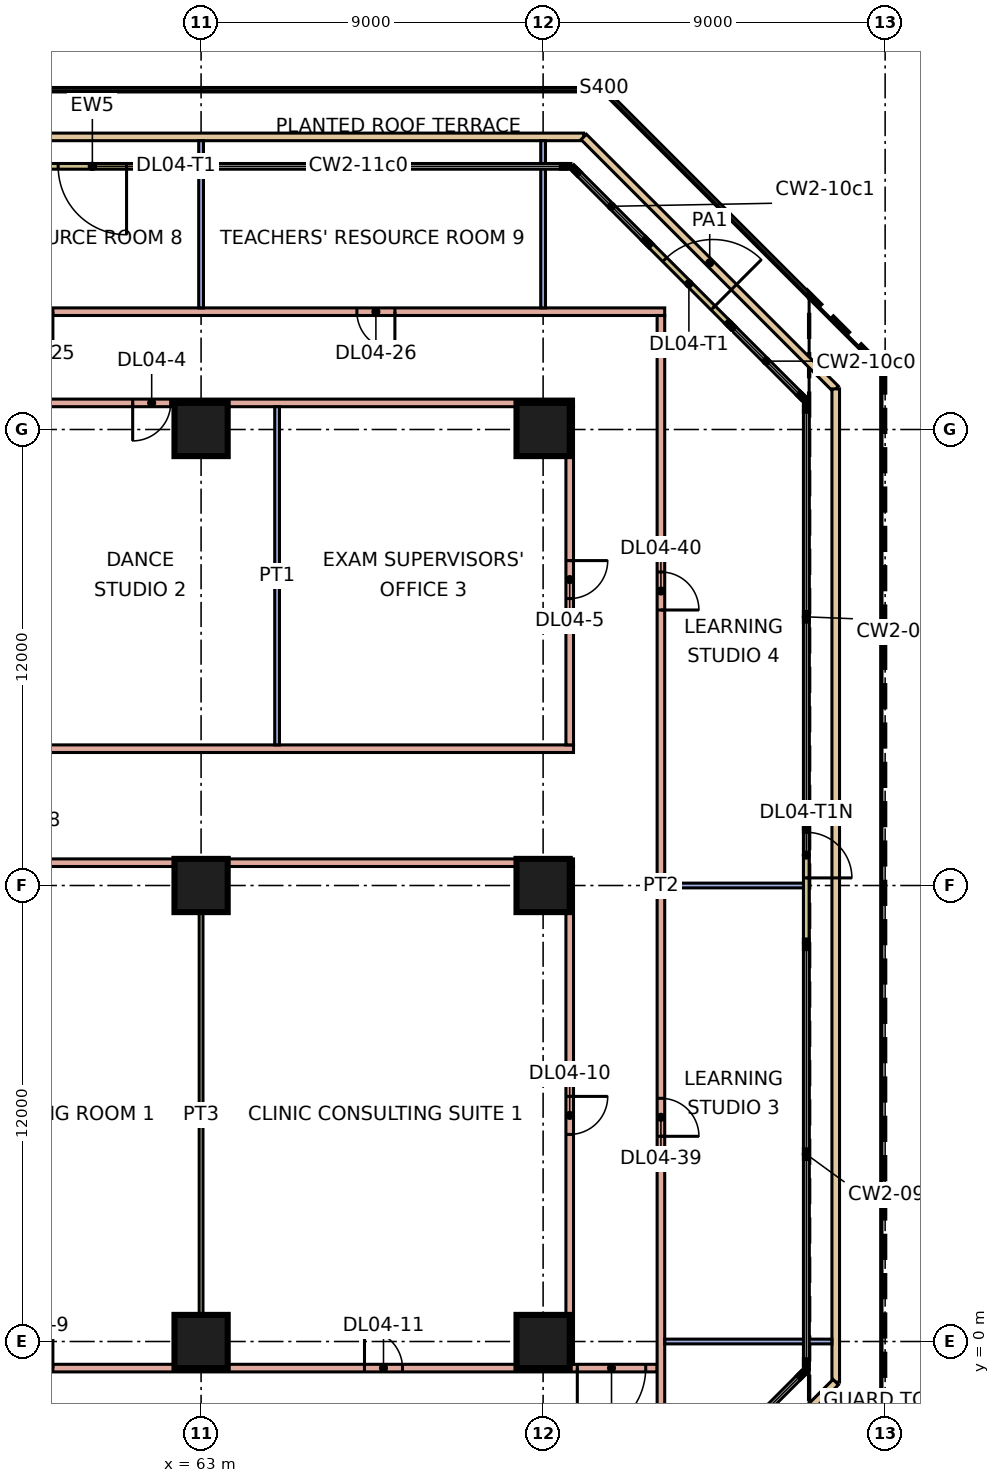
"""IFC4 building model, lengths in metres.
Left out: names, types, materials, properties, quantities, classifications, styles, units other than length and angle.
Written with IfcOpenShell. Run it as: python <this file> out.ifc"""

import sys

from ifc_helpers import new_model, si_unit, direction, frame, frame_2d, origin, origin_2d, place, context, subcontext, project, spatial, rectangle, extrude, element, fill, save


model = new_model("IFC4")
c1 = context("Model", 3, precision=1e-05, world=origin(), true_north=direction((0.0, 1.0)))
c2 = subcontext(c1, "Body", "Model", "MODEL_VIEW")
j1 = project(units=[si_unit("LENGTHUNIT", "METRE"), si_unit("PLANEANGLEUNIT", "RADIAN")], contexts=[c1])
p1 = place(None, origin())
s1 = spatial("IfcSite", under=j1, at=p1, CompositionType="ELEMENT")
p2 = place(p1, origin())
s2 = spatial("IfcBuilding", under=s1, at=p2, CompositionType="ELEMENT")
p3 = place(p2, frame((0.0, 0.0, 21.6)))
s3 = spatial("IfcBuildingStorey", under=s2, at=p3, CompositionType="ELEMENT", Elevation=21.6)
for number, where, z_axis, x_axis in (
    (1, (63.0, 0.0, 0.0), (0.0, 0.0, 1.0), (1.0, 0.0, 0.0)),
    (2, (72.0, 0.0, 0.0), (0.0, 0.0, 1.0), (1.0, 0.0, 0.0)),
    (3, (63.0, 12.0, 0.0), (0.0, 0.0, 1.0), (1.0, 0.0, 0.0)),
    (4, (72.0, 12.0, 0.0), (0.0, 0.0, 1.0), (1.0, 0.0, 0.0)),
    (5, (63.0, 24.0, 0.0), (0.0, 0.0, 1.0), (1.0, 0.0, 0.0)),
    (6, (72.0, 24.0, 0.0), (0.0, 0.0, 1.0), (1.0, 0.0, 0.0)),
):
    element("IfcColumn", number, at=place(p3, frame(where, z_axis=z_axis, x_axis=x_axis)), inside=s3, PredefinedType="COLUMN", context=c2, shape_type="SweptSolid", body=[
        extrude(rectangle(XDim=1.4, YDim=1.4, at=origin_2d()), origin(), (0.0, 0.0, 1.0), 4.8),
    ])
p4 = place(p3, frame((78.925, 10.5, 0.0), z_axis=(0.0, 0.0, 1.0), x_axis=(0.0, 1.0, 0.0)))
e7 = element("IfcWall", 7, at=p4, inside=s3, PredefinedType="SOLIDWALL", context=c2, shape_type="SweptSolid", body=[
    extrude(rectangle(XDim=3.0, YDim=0.15, at=frame_2d((1.5, 0.0))), origin(), (0.0, 0.0, 1.0), 4.4),
])
p5 = place(p4, frame((1.7, 0.0, 0.0)))
e8 = element("IfcOpeningElement", 8, at=p5, cuts=e7, PredefinedType="OPENING", context=c2, shape_type="SweptSolid", body=[
    extrude(rectangle(XDim=1.2, YDim=2.4, at=frame_2d((0.6, 1.2))), frame((0.0, 0.085, 0.0), z_axis=(0.0, -1.0, 0.0), x_axis=(1.0, 0.0, 0.0)), (0.0, 0.0, 1.0), 0.17),
])
p6 = place(p3, frame((76.897, 26.775, 0.0), z_axis=(0.0, 0.0, 1.0), x_axis=(-0.707106781187, 0.707106781187, 0.0)))
e9 = element("IfcWall", 9, at=p6, inside=s3, PredefinedType="SOLIDWALL", context=c2, shape_type="SweptSolid", body=[
    extrude(rectangle(XDim=3.0, YDim=0.15, at=frame_2d((1.5, 0.0))), origin(), (0.0, 0.0, 1.0), 4.4),
])
p7 = place(p6, frame((0.6, 0.0, 0.0)))
e10 = element("IfcOpeningElement", 10, at=p7, cuts=e9, PredefinedType="OPENING", context=c2, shape_type="SweptSolid", body=[
    extrude(rectangle(XDim=1.8, YDim=2.4, at=frame_2d((0.9, 1.2))), frame((0.0, 0.085, 0.0), z_axis=(0.0, -1.0, 0.0), x_axis=(1.0, 0.0, 0.0)), (0.0, 0.0, 1.0), 0.17),
])
p8 = place(p3, frame((61.639, 30.925, 0.0), z_axis=(0.0, 0.0, 1.0), x_axis=(-1.0, 0.0, 0.0)))
e11 = element("IfcWall", 11, at=p8, inside=s3, PredefinedType="SOLIDWALL", context=c2, shape_type="SweptSolid", body=[
    extrude(rectangle(XDim=3.0, YDim=0.15, at=frame_2d((1.5, 0.0))), origin(), (0.0, 0.0, 1.0), 4.4),
])
p9 = place(p8, frame((0.6, 0.0, 0.0)))
e12 = element("IfcOpeningElement", 12, at=p9, cuts=e11, PredefinedType="OPENING", context=c2, shape_type="SweptSolid", body=[
    extrude(rectangle(XDim=1.8, YDim=2.4, at=frame_2d((0.9, 1.2))), frame((0.0, 0.085, 0.0), z_axis=(0.0, -1.0, 0.0), x_axis=(1.0, 0.0, 0.0)), (0.0, 0.0, 1.0), 0.17),
])
p10 = place(p3, frame((48.2, 31.7, 0.0), z_axis=(0.0, 0.0, 1.0), x_axis=(1.0, 0.0, 0.0)))
e13 = element("IfcWall", 13, at=p10, inside=s3, PredefinedType="PARAPET", context=c2, shape_type="SweptSolid", body=[
    extrude(rectangle(XDim=24.868, YDim=0.2, at=frame_2d((12.434, 0.0))), origin(), (0.0, 0.0, 1.0), 0.5),
])
p11 = place(p3, frame((73.068, 31.7, 0.0), z_axis=(0.0, 0.0, 1.0), x_axis=(0.707106781187, -0.707106781187, 0.0)))
e14 = element("IfcWall", 14, at=p11, inside=s3, PredefinedType="PARAPET", context=c2, shape_type="SweptSolid", body=[
    extrude(rectangle(XDim=9.379, YDim=0.2, at=frame_2d((4.689, 0.0))), origin(), (0.0, 0.0, 1.0), 0.5),
])
p12 = place(p3, frame((79.7, 25.068, 0.0), z_axis=(0.0, 0.0, 1.0), x_axis=(0.0, -1.0, 0.0)))
e15 = element("IfcWall", 15, at=p12, inside=s3, PredefinedType="PARAPET", context=c2, shape_type="SweptSolid", body=[
    extrude(rectangle(XDim=26.136, YDim=0.2, at=frame_2d((13.068, 0.0))), origin(), (0.0, 0.0, 1.0), 0.5),
])
p13 = place(p3, frame((79.7, -1.068, 0.0), z_axis=(0.0, 0.0, 1.0), x_axis=(-0.707106781187, -0.707106781187, 0.0)))
e16 = element("IfcWall", 16, at=p13, inside=s3, PredefinedType="PARAPET", context=c2, shape_type="SweptSolid", body=[
    extrude(rectangle(XDim=9.379, YDim=0.2, at=frame_2d((4.689, 0.0))), origin(), (0.0, 0.0, 1.0), 0.5),
])
p14 = place(p3, frame((38.3, 27.1, 0.0), z_axis=(0.0, 0.0, 1.0), x_axis=(1.0, 0.0, 0.0)))
e17 = element("IfcWall", 17, at=p14, inside=s3, PredefinedType="PARTITIONING", context=c2, shape_type="SweptSolid", body=[
    extrude(rectangle(XDim=36.9, YDim=0.2, at=frame_2d((18.45, 0.0))), origin(), (0.0, 0.0, 1.0), 4.4),
])
p15 = place(p14, frame((10.8, 0.0, 0.0)))
e18 = element("IfcOpeningElement", 18, at=p15, cuts=e17, PredefinedType="OPENING", context=c2, shape_type="SweptSolid", body=[
    extrude(rectangle(XDim=1.0, YDim=2.1, at=frame_2d((0.5, 1.05))), frame((0.0, 0.11, 0.0), z_axis=(0.0, -1.0, 0.0), x_axis=(1.0, 0.0, 0.0)), (0.0, 0.0, 1.0), 0.22),
])
p16 = place(p14, frame((19.8, 0.0, 0.0)))
e19 = element("IfcOpeningElement", 19, at=p16, cuts=e17, PredefinedType="OPENING", context=c2, shape_type="SweptSolid", body=[
    extrude(rectangle(XDim=1.0, YDim=2.1, at=frame_2d((0.5, 1.05))), frame((0.0, 0.11, 0.0), z_axis=(0.0, -1.0, 0.0), x_axis=(1.0, 0.0, 0.0)), (0.0, 0.0, 1.0), 0.22),
])
p17 = place(p14, frame((28.8, 0.0, 0.0)))
e20 = element("IfcOpeningElement", 20, at=p17, cuts=e17, PredefinedType="OPENING", context=c2, shape_type="SweptSolid", body=[
    extrude(rectangle(XDim=1.0, YDim=2.1, at=frame_2d((0.5, 1.05))), frame((0.0, 0.11, 0.0), z_axis=(0.0, -1.0, 0.0), x_axis=(1.0, 0.0, 0.0)), (0.0, 0.0, 1.0), 0.22),
])
p18 = place(p3, frame((40.2, 24.7, 0.0), z_axis=(0.0, 0.0, 1.0), x_axis=(1.0, 0.0, 0.0)))
e21 = element("IfcWall", 21, at=p18, inside=s3, PredefinedType="PARTITIONING", context=c2, shape_type="SweptSolid", body=[
    extrude(rectangle(XDim=32.6, YDim=0.2, at=frame_2d((16.3, 0.0))), origin(), (0.0, 0.0, 1.0), 4.4),
])
p19 = place(p18, frame((2.65, 0.0, 0.0)))
e22 = element("IfcOpeningElement", 22, at=p19, cuts=e21, PredefinedType="OPENING", context=c2, shape_type="SweptSolid", body=[
    extrude(rectangle(XDim=1.0, YDim=2.1, at=frame_2d((0.5, 1.05))), frame((0.0, 0.11, 0.0), z_axis=(0.0, -1.0, 0.0), x_axis=(1.0, 0.0, 0.0)), (0.0, 0.0, 1.0), 0.22),
])
p20 = place(p18, frame((8.85, 0.0, 0.0)))
e23 = element("IfcOpeningElement", 23, at=p20, cuts=e21, PredefinedType="OPENING", context=c2, shape_type="SweptSolid", body=[
    extrude(rectangle(XDim=1.0, YDim=2.1, at=frame_2d((0.5, 1.05))), frame((0.0, 0.11, 0.0), z_axis=(0.0, -1.0, 0.0), x_axis=(1.0, 0.0, 0.0)), (0.0, 0.0, 1.0), 0.22),
])
p21 = place(p18, frame((15.05, 0.0, 0.0)))
e24 = element("IfcOpeningElement", 24, at=p21, cuts=e21, PredefinedType="OPENING", context=c2, shape_type="SweptSolid", body=[
    extrude(rectangle(XDim=1.0, YDim=2.1, at=frame_2d((0.5, 1.05))), frame((0.0, 0.11, 0.0), z_axis=(0.0, -1.0, 0.0), x_axis=(1.0, 0.0, 0.0)), (0.0, 0.0, 1.0), 0.22),
])
p22 = place(p18, frame((21.0, 0.0, 0.0)))
e25 = element("IfcOpeningElement", 25, at=p22, cuts=e21, PredefinedType="OPENING", context=c2, shape_type="SweptSolid", body=[
    extrude(rectangle(XDim=1.0, YDim=2.1, at=frame_2d((0.5, 1.05))), frame((0.0, 0.11, 0.0), z_axis=(0.0, -1.0, 0.0), x_axis=(1.0, 0.0, 0.0)), (0.0, 0.0, 1.0), 0.22),
])
p23 = place(p3, frame((51.225, 15.6, 0.0), z_axis=(0.0, 0.0, 1.0), x_axis=(1.0, 0.0, 0.0)))
e26 = element("IfcWall", 26, at=p23, inside=s3, PredefinedType="PARTITIONING", context=c2, shape_type="SweptSolid", body=[
    extrude(rectangle(XDim=21.575, YDim=0.2, at=frame_2d((10.788, 0.0))), origin(), (0.0, 0.0, 1.0), 4.4),
])
p24 = place(p3, frame((54.0, -0.7, 0.0), z_axis=(0.0, 0.0, 1.0), x_axis=(1.0, 0.0, 0.0)))
e27 = element("IfcWall", 27, at=p24, inside=s3, PredefinedType="PARTITIONING", context=c2, shape_type="SweptSolid", body=[
    extrude(rectangle(XDim=21.0, YDim=0.2, at=frame_2d((10.5, 0.0))), origin(), (0.0, 0.0, 1.0), 4.4),
])
p25 = place(p24, frame((4.1, 0.0, 0.0)))
e28 = element("IfcOpeningElement", 28, at=p25, cuts=e27, PredefinedType="OPENING", context=c2, shape_type="SweptSolid", body=[
    extrude(rectangle(XDim=1.0, YDim=2.1, at=frame_2d((0.5, 1.05))), frame((0.0, 0.11, 0.0), z_axis=(0.0, -1.0, 0.0), x_axis=(1.0, 0.0, 0.0)), (0.0, 0.0, 1.0), 0.22),
])
p26 = place(p24, frame((13.3, 0.0, 0.0)))
e29 = element("IfcOpeningElement", 29, at=p26, cuts=e27, PredefinedType="OPENING", context=c2, shape_type="SweptSolid", body=[
    extrude(rectangle(XDim=1.0, YDim=2.1, at=frame_2d((0.5, 1.05))), frame((0.0, 0.11, 0.0), z_axis=(0.0, -1.0, 0.0), x_axis=(1.0, 0.0, 0.0)), (0.0, 0.0, 1.0), 0.22),
])
p27 = place(p24, frame((18.9, 0.0, 0.0)))
e30 = element("IfcOpeningElement", 30, at=p27, cuts=e27, PredefinedType="OPENING", context=c2, shape_type="SweptSolid", body=[
    extrude(rectangle(XDim=1.8, YDim=2.1, at=frame_2d((0.9, 1.05))), frame((0.0, 0.11, 0.0), z_axis=(0.0, -1.0, 0.0), x_axis=(1.0, 0.0, 0.0)), (0.0, 0.0, 1.0), 0.22),
])
p28 = place(p3, frame((54.0, 12.6, 0.0), z_axis=(0.0, 0.0, 1.0), x_axis=(1.0, 0.0, 0.0)))
e31 = element("IfcWall", 31, at=p28, inside=s3, PredefinedType="PARTITIONING", context=c2, shape_type="SweptSolid", body=[
    extrude(rectangle(XDim=18.8, YDim=0.2, at=frame_2d((9.4, 0.0))), origin(), (0.0, 0.0, 1.0), 4.4),
])
p29 = place(p28, frame((3.9, 0.0, 0.0)))
e32 = element("IfcOpeningElement", 32, at=p29, cuts=e31, PredefinedType="OPENING", context=c2, shape_type="SweptSolid", body=[
    extrude(rectangle(XDim=1.0, YDim=2.1, at=frame_2d((0.5, 1.05))), frame((0.0, 0.11, 0.0), z_axis=(0.0, -1.0, 0.0), x_axis=(1.0, 0.0, 0.0)), (0.0, 0.0, 1.0), 0.22),
])
p30 = place(p3, frame((63.0, -0.6, 0.0), z_axis=(0.0, 0.0, 1.0), x_axis=(0.0, 1.0, 0.0)))
e33 = element("IfcWall", 33, at=p30, inside=s3, PredefinedType="PARTITIONING", context=c2, shape_type="SweptSolid", body=[
    extrude(rectangle(XDim=13.1, YDim=0.1, at=frame_2d((6.55, 0.0))), origin(), (0.0, 0.0, 1.0), 4.4),
])
p31 = place(p3, frame((63.0, 27.2, 0.0), z_axis=(0.0, 0.0, 1.0), x_axis=(0.0, 1.0, 0.0)))
e34 = element("IfcWall", 34, at=p31, inside=s3, PredefinedType="PARTITIONING", context=c2, shape_type="SweptSolid", body=[
    extrude(rectangle(XDim=4.4, YDim=0.125, at=frame_2d((2.2, 0.0))), origin(), (0.0, 0.0, 1.0), 4.4),
])
p32 = place(p3, frame((65.0, 15.7, 0.0), z_axis=(0.0, 0.0, 1.0), x_axis=(0.0, 1.0, 0.0)))
e35 = element("IfcWall", 35, at=p32, inside=s3, PredefinedType="PARTITIONING", context=c2, shape_type="SweptSolid", body=[
    extrude(rectangle(XDim=8.9, YDim=0.125, at=frame_2d((4.45, 0.0))), origin(), (0.0, 0.0, 1.0), 4.4),
])
p33 = place(p3, frame((72.0, 27.2, 0.0), z_axis=(0.0, 0.0, 1.0), x_axis=(0.0, 1.0, 0.0)))
e36 = element("IfcWall", 36, at=p33, inside=s3, PredefinedType="PARTITIONING", context=c2, shape_type="SweptSolid", body=[
    extrude(rectangle(XDim=4.4, YDim=0.125, at=frame_2d((2.2, 0.0))), origin(), (0.0, 0.0, 1.0), 4.4),
])
p34 = place(p3, frame((72.7, -0.6, 0.0), z_axis=(0.0, 0.0, 1.0), x_axis=(0.0, 1.0, 0.0)))
e37 = element("IfcWall", 37, at=p34, inside=s3, PredefinedType="PARTITIONING", context=c2, shape_type="SweptSolid", body=[
    extrude(rectangle(XDim=13.1, YDim=0.2, at=frame_2d((6.55, 0.0))), origin(), (0.0, 0.0, 1.0), 4.4),
])
p35 = place(p34, frame((6.05, 0.0, 0.0)))
e38 = element("IfcOpeningElement", 38, at=p35, cuts=e37, PredefinedType="OPENING", context=c2, shape_type="SweptSolid", body=[
    extrude(rectangle(XDim=1.0, YDim=2.1, at=frame_2d((0.5, 1.05))), frame((0.0, 0.11, 0.0), z_axis=(0.0, -1.0, 0.0), x_axis=(1.0, 0.0, 0.0)), (0.0, 0.0, 1.0), 0.22),
])
p36 = place(p3, frame((72.7, 15.7, 0.0), z_axis=(0.0, 0.0, 1.0), x_axis=(0.0, 1.0, 0.0)))
e39 = element("IfcWall", 39, at=p36, inside=s3, PredefinedType="PARTITIONING", context=c2, shape_type="SweptSolid", body=[
    extrude(rectangle(XDim=8.9, YDim=0.2, at=frame_2d((4.45, 0.0))), origin(), (0.0, 0.0, 1.0), 4.4),
])
p37 = place(p36, frame((3.85, 0.0, 0.0)))
e40 = element("IfcOpeningElement", 40, at=p37, cuts=e39, PredefinedType="OPENING", context=c2, shape_type="SweptSolid", body=[
    extrude(rectangle(XDim=1.0, YDim=2.1, at=frame_2d((0.5, 1.05))), frame((0.0, 0.11, 0.0), z_axis=(0.0, -1.0, 0.0), x_axis=(1.0, 0.0, 0.0)), (0.0, 0.0, 1.0), 0.22),
])
p38 = place(p3, frame((75.1, -3.0, 0.0), z_axis=(0.0, 0.0, 1.0), x_axis=(0.0, 1.0, 0.0)))
e41 = element("IfcWall", 41, at=p38, inside=s3, PredefinedType="PARTITIONING", context=c2, shape_type="SweptSolid", body=[
    extrude(rectangle(XDim=30.0, YDim=0.2, at=frame_2d((15.0, 0.0))), origin(), (0.0, 0.0, 1.0), 4.4),
])
p39 = place(p38, frame((8.4, 0.0, 0.0)))
e42 = element("IfcOpeningElement", 42, at=p39, cuts=e41, PredefinedType="OPENING", context=c2, shape_type="SweptSolid", body=[
    extrude(rectangle(XDim=1.0, YDim=2.1, at=frame_2d((0.5, 1.05))), frame((0.0, 0.11, 0.0), z_axis=(0.0, -1.0, 0.0), x_axis=(1.0, 0.0, 0.0)), (0.0, 0.0, 1.0), 0.22),
])
p40 = place(p38, frame((22.25, 0.0, 0.0)))
e43 = element("IfcOpeningElement", 43, at=p40, cuts=e41, PredefinedType="OPENING", context=c2, shape_type="SweptSolid", body=[
    extrude(rectangle(XDim=1.0, YDim=2.1, at=frame_2d((0.5, 1.05))), frame((0.0, 0.11, 0.0), z_axis=(0.0, -1.0, 0.0), x_axis=(1.0, 0.0, 0.0)), (0.0, 0.0, 1.0), 0.22),
])
p41 = place(p3, frame((75.2, 0.0, 0.0), z_axis=(0.0, 0.0, 1.0), x_axis=(1.0, 0.0, 0.0)))
e44 = element("IfcWall", 44, at=p41, inside=s3, PredefinedType="PARTITIONING", context=c2, shape_type="SweptSolid", body=[
    extrude(rectangle(XDim=4.4, YDim=0.125, at=frame_2d((2.2, 0.0))), origin(), (0.0, 0.0, 1.0), 4.4),
])
p42 = place(p3, frame((75.2, 12.0, 0.0), z_axis=(0.0, 0.0, 1.0), x_axis=(1.0, 0.0, 0.0)))
e45 = element("IfcWall", 45, at=p42, inside=s3, PredefinedType="PARTITIONING", context=c2, shape_type="SweptSolid", body=[
    extrude(rectangle(XDim=3.651, YDim=0.125, at=frame_2d((1.826, 0.0))), origin(), (0.0, 0.0, 1.0), 4.4),
])
p43 = place(p5, frame((1.2, 0.0, 0.0), z_axis=(0.0, 0.0, 1.0), x_axis=(-1.0, 0.0, 0.0)))
e46 = element("IfcDoor", 46, at=p43, inside=s3, OperationType="DOUBLE_DOOR_SINGLE_SWING", PredefinedType="DOOR", context=c2, shape_type="SweptSolid", body=[
    extrude(rectangle(XDim=1.2, YDim=2.4, at=frame_2d((0.6, 1.2))), frame((0.0, 0.025, 0.0), z_axis=(0.0, -1.0, 0.0), x_axis=(1.0, 0.0, 0.0)), (0.0, 0.0, 1.0), 0.05),
])
fill(e8, e46)
p44 = place(p7, frame((1.8, 0.0, 0.0), z_axis=(0.0, 0.0, 1.0), x_axis=(-1.0, 0.0, 0.0)))
e47 = element("IfcDoor", 47, at=p44, inside=s3, OperationType="DOUBLE_DOOR_SINGLE_SWING", PredefinedType="DOOR", context=c2, shape_type="SweptSolid", body=[
    extrude(rectangle(XDim=1.8, YDim=2.4, at=frame_2d((0.9, 1.2))), frame((0.0, 0.025, 0.0), z_axis=(0.0, -1.0, 0.0), x_axis=(1.0, 0.0, 0.0)), (0.0, 0.0, 1.0), 0.05),
])
fill(e10, e47)
p45 = place(p9, origin())
e48 = element("IfcDoor", 48, at=p45, inside=s3, OperationType="DOUBLE_DOOR_SINGLE_SWING", PredefinedType="DOOR", context=c2, shape_type="SweptSolid", body=[
    extrude(rectangle(XDim=1.8, YDim=2.4, at=frame_2d((0.9, 1.2))), frame((0.0, 0.025, 0.0), z_axis=(0.0, -1.0, 0.0), x_axis=(1.0, 0.0, 0.0)), (0.0, 0.0, 1.0), 0.05),
])
fill(e12, e48)
p46 = place(p22, frame((1.0, 0.0, 0.0), z_axis=(0.0, 0.0, 1.0), x_axis=(-1.0, 0.0, 0.0)))
e49 = element("IfcDoor", 49, at=p46, inside=s3, OperationType="SINGLE_SWING_LEFT", PredefinedType="DOOR", context=c2, shape_type="SweptSolid", body=[
    extrude(rectangle(XDim=1.0, YDim=2.1, at=frame_2d((0.5, 1.05))), frame((0.0, 0.025, 0.0), z_axis=(0.0, -1.0, 0.0), x_axis=(1.0, 0.0, 0.0)), (0.0, 0.0, 1.0), 0.05),
])
fill(e25, e49)
p47 = place(p37, origin())
e50 = element("IfcDoor", 50, at=p47, inside=s3, OperationType="SINGLE_SWING_RIGHT", PredefinedType="DOOR", context=c2, shape_type="SweptSolid", body=[
    extrude(rectangle(XDim=1.0, YDim=2.1, at=frame_2d((0.5, 1.05))), frame((0.0, 0.025, 0.0), z_axis=(0.0, -1.0, 0.0), x_axis=(1.0, 0.0, 0.0)), (0.0, 0.0, 1.0), 0.05),
])
fill(e40, e50)
p48 = place(p25, frame((1.0, 0.0, 0.0), z_axis=(0.0, 0.0, 1.0), x_axis=(-1.0, 0.0, 0.0)))
e51 = element("IfcDoor", 51, at=p48, inside=s3, OperationType="SINGLE_SWING_RIGHT", PredefinedType="DOOR", context=c2, shape_type="SweptSolid", body=[
    extrude(rectangle(XDim=1.0, YDim=2.1, at=frame_2d((0.5, 1.05))), frame((0.0, 0.025, 0.0), z_axis=(0.0, -1.0, 0.0), x_axis=(1.0, 0.0, 0.0)), (0.0, 0.0, 1.0), 0.05),
])
fill(e28, e51)
p49 = place(p35, origin())
e52 = element("IfcDoor", 52, at=p49, inside=s3, OperationType="SINGLE_SWING_RIGHT", PredefinedType="DOOR", context=c2, shape_type="SweptSolid", body=[
    extrude(rectangle(XDim=1.0, YDim=2.1, at=frame_2d((0.5, 1.05))), frame((0.0, 0.025, 0.0), z_axis=(0.0, -1.0, 0.0), x_axis=(1.0, 0.0, 0.0)), (0.0, 0.0, 1.0), 0.05),
])
fill(e38, e52)
p50 = place(p26, origin())
e53 = element("IfcDoor", 53, at=p50, inside=s3, OperationType="SINGLE_SWING_LEFT", PredefinedType="DOOR", context=c2, shape_type="SweptSolid", body=[
    extrude(rectangle(XDim=1.0, YDim=2.1, at=frame_2d((0.5, 1.05))), frame((0.0, 0.025, 0.0), z_axis=(0.0, -1.0, 0.0), x_axis=(1.0, 0.0, 0.0)), (0.0, 0.0, 1.0), 0.05),
])
fill(e29, e53)
p51 = place(p16, origin())
e54 = element("IfcDoor", 54, at=p51, inside=s3, OperationType="SINGLE_SWING_RIGHT", PredefinedType="DOOR", context=c2, shape_type="SweptSolid", body=[
    extrude(rectangle(XDim=1.0, YDim=2.1, at=frame_2d((0.5, 1.05))), frame((0.0, 0.025, 0.0), z_axis=(0.0, -1.0, 0.0), x_axis=(1.0, 0.0, 0.0)), (0.0, 0.0, 1.0), 0.05),
])
fill(e19, e54)
p52 = place(p17, origin())
e55 = element("IfcDoor", 55, at=p52, inside=s3, OperationType="SINGLE_SWING_RIGHT", PredefinedType="DOOR", context=c2, shape_type="SweptSolid", body=[
    extrude(rectangle(XDim=1.0, YDim=2.1, at=frame_2d((0.5, 1.05))), frame((0.0, 0.025, 0.0), z_axis=(0.0, -1.0, 0.0), x_axis=(1.0, 0.0, 0.0)), (0.0, 0.0, 1.0), 0.05),
])
fill(e20, e55)
p53 = place(p27, frame((1.8, 0.0, 0.0), z_axis=(0.0, 0.0, 1.0), x_axis=(-1.0, 0.0, 0.0)))
e56 = element("IfcDoor", 56, at=p53, inside=s3, OperationType="DOUBLE_DOOR_SINGLE_SWING", PredefinedType="DOOR", context=c2, shape_type="SweptSolid", body=[
    extrude(rectangle(XDim=1.8, YDim=2.1, at=frame_2d((0.9, 1.05))), frame((0.0, 0.025, 0.0), z_axis=(0.0, -1.0, 0.0), x_axis=(1.0, 0.0, 0.0)), (0.0, 0.0, 1.0), 0.05),
])
fill(e30, e56)
p54 = place(p39, frame((1.0, 0.0, 0.0), z_axis=(0.0, 0.0, 1.0), x_axis=(-1.0, 0.0, 0.0)))
e57 = element("IfcDoor", 57, at=p54, inside=s3, OperationType="SINGLE_SWING_LEFT", PredefinedType="DOOR", context=c2, shape_type="SweptSolid", body=[
    extrude(rectangle(XDim=1.0, YDim=2.1, at=frame_2d((0.5, 1.05))), frame((0.0, 0.025, 0.0), z_axis=(0.0, -1.0, 0.0), x_axis=(1.0, 0.0, 0.0)), (0.0, 0.0, 1.0), 0.05),
])
fill(e42, e57)
p55 = place(p40, frame((1.0, 0.0, 0.0), z_axis=(0.0, 0.0, 1.0), x_axis=(-1.0, 0.0, 0.0)))
e58 = element("IfcDoor", 58, at=p55, inside=s3, OperationType="SINGLE_SWING_LEFT", PredefinedType="DOOR", context=c2, shape_type="SweptSolid", body=[
    extrude(rectangle(XDim=1.0, YDim=2.1, at=frame_2d((0.5, 1.05))), frame((0.0, 0.025, 0.0), z_axis=(0.0, -1.0, 0.0), x_axis=(1.0, 0.0, 0.0)), (0.0, 0.0, 1.0), 0.05),
])
fill(e43, e58)
save(model, sys.argv[1])
